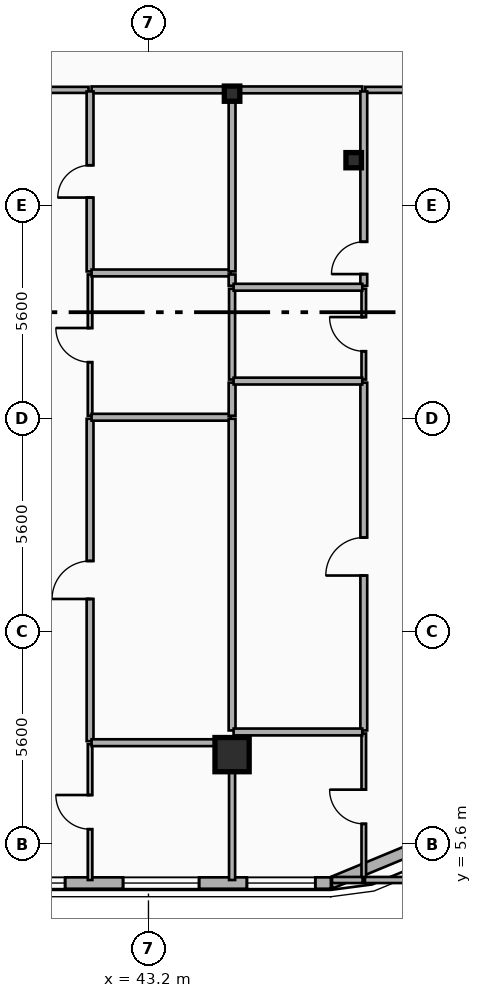
"""IFC4 building model, lengths in metres.
Left out: names, types, materials, properties, quantities, classifications, styles, units other than length and angle.
Written with IfcOpenShell. Run it as: python <this file> out.ifc"""

import sys

from ifc_helpers import new_model, si_unit, direction, frame, frame_2d, origin, origin_2d, place, context, subcontext, project, spatial, rectangle, i_section, extrude, element, fill, save


model = new_model("IFC4")
c1 = context("Model", 3, precision=1e-05, world=origin(), true_north=direction((0.0, 1.0)))
c2 = subcontext(c1, "Body", "Model", "MODEL_VIEW")
j1 = project(units=[si_unit("LENGTHUNIT", "METRE"), si_unit("PLANEANGLEUNIT", "RADIAN")], contexts=[c1])
p1 = place(None, origin())
s1 = spatial("IfcSite", under=j1, at=p1, CompositionType="ELEMENT")
p2 = place(p1, origin())
s2 = spatial("IfcBuilding", under=s1, at=p2, CompositionType="ELEMENT")
p3 = place(p2, frame((0.0, 0.0, 200.4)))
s3 = spatial("IfcBuildingStorey", under=s2, at=p3, CompositionType="ELEMENT", Elevation=200.4)
p4 = place(p3, frame((45.4, 25.35, 0.0), z_axis=(0.0, 0.0, 1.0), x_axis=(1.0, 0.0, 0.0)))
e1 = element("IfcColumn", 1, at=p4, inside=s3, PredefinedType="COLUMN", context=c2, shape_type="SweptSolid", body=[
    extrude(i_section(OverallWidth=0.408, OverallDepth=0.4, WebThickness=0.025, FlangeThickness=0.039, FilletRadius=0.015, at=origin_2d()), origin(), (0.0, 0.0, 1.0), 3.6),
])
p5 = place(p3, frame((45.4, 8.068, 0.0), z_axis=(0.0, -0.090231265542, 0.995920839584), x_axis=(1.0, 0.0, 0.0)))
e2 = element("IfcColumn", 2, at=p5, inside=s3, PredefinedType="COLUMN", context=c2, shape_type="SweptSolid", body=[
    extrude(rectangle(XDim=0.9, YDim=0.9, at=origin_2d()), origin(), (0.0, 0.0, 1.0), 3.615),
])
p6 = place(p3, frame((48.6, 23.6, 0.0), z_axis=(0.0, 0.0, 1.0), x_axis=(1.0, 0.0, 0.0)))
e3 = element("IfcColumn", 3, at=p6, inside=s3, PredefinedType="COLUMN", context=c2, shape_type="SweptSolid", body=[
    extrude(i_section(OverallWidth=0.408, OverallDepth=0.4, WebThickness=0.025, FlangeThickness=0.039, FilletRadius=0.015, at=origin_2d()), origin(), (0.0, 0.0, 1.0), 3.6),
])
p7 = place(p3, frame((50.843, 5.757, 0.0), z_axis=(0.0, 0.0, 1.0), x_axis=(-0.92389884758, -0.382636798336, 0.0)))
e4 = element("IfcWall", 4, at=p7, inside=s3, PredefinedType="SOLIDWALL", context=c2, shape_type="SweptSolid", body=[
    extrude(rectangle(XDim=3.077, YDim=0.3, at=frame_2d((1.538, 0.0))), origin(), (0.0, 0.0, 1.0), 3.34),
])
p8 = place(p3, frame((48.0, 4.58, 0.0), z_axis=(0.0, 0.0, 1.0), x_axis=(-1.0, 0.0, 0.0)))
e5 = element("IfcWall", 5, at=p8, inside=s3, PredefinedType="SOLIDWALL", context=c2, shape_type="SweptSolid", body=[
    extrude(rectangle(XDim=38.4, YDim=0.3, at=frame_2d((19.2, 0.0))), origin(), (0.0, 0.0, 1.0), 3.34),
])
p9 = place(p8, frame((36.19, 0.0, 0.8)))
e6 = element("IfcOpeningElement", 6, at=p9, cuts=e5, PredefinedType="OPENING", context=c2, shape_type="SweptSolid", body=[
    extrude(rectangle(XDim=1.8, YDim=1.8, at=frame_2d((0.9, 0.9))), frame((0.0, 0.16, 0.0), z_axis=(0.0, -1.0, 0.0), x_axis=(1.0, 0.0, 0.0)), (0.0, 0.0, 1.0), 0.32),
])
p10 = place(p8, frame((29.712, 0.0, 0.7)))
e7 = element("IfcOpeningElement", 7, at=p10, cuts=e5, PredefinedType="OPENING", context=c2, shape_type="SweptSolid", body=[
    extrude(rectangle(XDim=2.0, YDim=2.2, at=frame_2d((1.0, 1.1))), frame((0.0, 0.16, 0.0), z_axis=(0.0, -1.0, 0.0), x_axis=(1.0, 0.0, 0.0)), (0.0, 0.0, 1.0), 0.32),
])
p11 = place(p8, frame((33.038, 0.0, 0.7)))
e8 = element("IfcOpeningElement", 8, at=p11, cuts=e5, PredefinedType="OPENING", context=c2, shape_type="SweptSolid", body=[
    extrude(rectangle(XDim=2.0, YDim=2.2, at=frame_2d((1.0, 1.1))), frame((0.0, 0.16, 0.0), z_axis=(0.0, -1.0, 0.0), x_axis=(1.0, 0.0, 0.0)), (0.0, 0.0, 1.0), 0.32),
])
p12 = place(p8, frame((20.0, 0.0, 0.7)))
e9 = element("IfcOpeningElement", 9, at=p12, cuts=e5, PredefinedType="OPENING", context=c2, shape_type="SweptSolid", body=[
    extrude(rectangle(XDim=2.0, YDim=2.2, at=frame_2d((1.0, 1.1))), frame((0.0, 0.16, 0.0), z_axis=(0.0, -1.0, 0.0), x_axis=(1.0, 0.0, 0.0)), (0.0, 0.0, 1.0), 0.32),
])
p13 = place(p8, frame((25.2, 0.0, 0.7)))
e10 = element("IfcOpeningElement", 10, at=p13, cuts=e5, PredefinedType="OPENING", context=c2, shape_type="SweptSolid", body=[
    extrude(rectangle(XDim=2.0, YDim=2.2, at=frame_2d((1.0, 1.1))), frame((0.0, 0.16, 0.0), z_axis=(0.0, -1.0, 0.0), x_axis=(1.0, 0.0, 0.0)), (0.0, 0.0, 1.0), 0.32),
])
p14 = place(p8, frame((13.4, 0.0, 0.7)))
e11 = element("IfcOpeningElement", 11, at=p14, cuts=e5, PredefinedType="OPENING", context=c2, shape_type="SweptSolid", body=[
    extrude(rectangle(XDim=2.0, YDim=2.2, at=frame_2d((1.0, 1.1))), frame((0.0, 0.16, 0.0), z_axis=(0.0, -1.0, 0.0), x_axis=(1.0, 0.0, 0.0)), (0.0, 0.0, 1.0), 0.32),
])
p15 = place(p8, frame((6.993, 0.0, 0.7)))
e12 = element("IfcOpeningElement", 12, at=p15, cuts=e5, PredefinedType="OPENING", context=c2, shape_type="SweptSolid", body=[
    extrude(rectangle(XDim=2.0, YDim=2.2, at=frame_2d((1.0, 1.1))), frame((0.0, 0.16, 0.0), z_axis=(0.0, -1.0, 0.0), x_axis=(1.0, 0.0, 0.0)), (0.0, 0.0, 1.0), 0.32),
])
p16 = place(p8, frame((3.469, 0.0, 0.7)))
e13 = element("IfcOpeningElement", 13, at=p16, cuts=e5, PredefinedType="OPENING", context=c2, shape_type="SweptSolid", body=[
    extrude(rectangle(XDim=2.0, YDim=2.2, at=frame_2d((1.0, 1.1))), frame((0.0, 0.16, 0.0), z_axis=(0.0, -1.0, 0.0), x_axis=(1.0, 0.0, 0.0)), (0.0, 0.0, 1.0), 0.32),
])
p17 = place(p8, frame((0.41, 0.0, 0.8)))
e14 = element("IfcOpeningElement", 14, at=p17, cuts=e5, PredefinedType="OPENING", context=c2, shape_type="SweptSolid", body=[
    extrude(rectangle(XDim=1.8, YDim=1.8, at=frame_2d((0.9, 0.9))), frame((0.0, 0.16, 0.0), z_axis=(0.0, -1.0, 0.0), x_axis=(1.0, 0.0, 0.0)), (0.0, 0.0, 1.0), 0.32),
])
p18 = place(p3, frame((38.39, 25.45, 0.0), z_axis=(0.0, 0.0, 1.0), x_axis=(1.0, 0.0, 0.0)))
e15 = element("IfcWall", 15, at=p18, inside=s3, PredefinedType="PARTITIONING", context=c2, shape_type="SweptSolid", body=[
    extrude(rectangle(XDim=3.233, YDim=0.16, at=frame_2d((1.617, 0.0))), origin(), (0.0, 0.0, 1.0), 3.34),
])
p19 = place(p18, frame((1.116, 0.0, 0.0)))
e16 = element("IfcOpeningElement", 16, at=p19, cuts=e15, PredefinedType="OPENING", context=c2, shape_type="SweptSolid", body=[
    extrude(rectangle(XDim=1.0, YDim=2.15, at=frame_2d((0.5, 1.075))), frame((0.0, 0.09, 0.0), z_axis=(0.0, -1.0, 0.0), x_axis=(1.0, 0.0, 0.0)), (0.0, 0.0, 1.0), 0.18),
])
p20 = place(p3, frame((41.703, 25.45, 0.0), z_axis=(0.0, 0.0, 1.0), x_axis=(1.0, 0.0, 0.0)))
e17 = element("IfcWall", 17, at=p20, inside=s3, PredefinedType="PLUMBINGWALL", context=c2, shape_type="SweptSolid", body=[
    extrude(rectangle(XDim=3.657, YDim=0.18, at=frame_2d((1.829, 0.0))), origin(), (0.0, 0.0, 1.0), 2.42),
])
p21 = place(p3, frame((48.906, 25.45, 0.0), z_axis=(0.0, 0.0, 1.0), x_axis=(1.0, 0.0, 0.0)))
e18 = element("IfcWall", 18, at=p21, inside=s3, PredefinedType="PARTITIONING", context=c2, shape_type="SweptSolid", body=[
    extrude(rectangle(XDim=3.034, YDim=0.16, at=frame_2d((1.517, 0.0))), origin(), (0.0, 0.0, 1.0), 2.67),
])
p22 = place(p21, frame((1.017, 0.0, 0.0)))
e19 = element("IfcOpeningElement", 19, at=p22, cuts=e18, PredefinedType="OPENING", context=c2, shape_type="SweptSolid", body=[
    extrude(rectangle(XDim=1.0, YDim=2.15, at=frame_2d((0.5, 1.075))), frame((0.0, 0.09, 0.0), z_axis=(0.0, -1.0, 0.0), x_axis=(1.0, 0.0, 0.0)), (0.0, 0.0, 1.0), 0.18),
])
p23 = place(p3, frame((45.44, 25.45, 0.0), z_axis=(0.0, 0.0, 1.0), x_axis=(1.0, 0.0, 0.0)))
e20 = element("IfcWall", 20, at=p23, inside=s3, PredefinedType="PLUMBINGWALL", context=c2, shape_type="SweptSolid", body=[
    extrude(rectangle(XDim=3.386, YDim=0.18, at=frame_2d((1.693, 0.0))), origin(), (0.0, 0.0, 1.0), 2.42),
])
p24 = place(p3, frame((41.663, 4.66, 0.0), z_axis=(0.0, 0.0, 1.0), x_axis=(0.0, 1.0, 0.0)))
e21 = element("IfcWall", 21, at=p24, inside=s3, PredefinedType="PARTITIONING", context=c2, shape_type="SweptSolid", body=[
    extrude(rectangle(XDim=3.573, YDim=0.12, at=frame_2d((1.787, 0.0))), origin(), (0.0, 0.0, 1.0), 3.0),
])
p25 = place(p24, frame((1.336, 0.0, 0.0)))
e22 = element("IfcOpeningElement", 22, at=p25, cuts=e21, PredefinedType="OPENING", context=c2, shape_type="SweptSolid", body=[
    extrude(rectangle(XDim=0.9, YDim=2.1, at=frame_2d((0.45, 1.05))), frame((0.0, 0.07, 0.0), z_axis=(0.0, -1.0, 0.0), x_axis=(1.0, 0.0, 0.0)), (0.0, 0.0, 1.0), 0.14),
])
p26 = place(p3, frame((41.663, 8.313, 0.0), z_axis=(0.0, 0.0, 1.0), x_axis=(0.0, 1.0, 0.0)))
e23 = element("IfcWall", 23, at=p26, inside=s3, PredefinedType="PLUMBINGWALL", context=c2, shape_type="SweptSolid", body=[
    extrude(rectangle(XDim=8.483, YDim=0.18, at=frame_2d((4.241, 0.0))), origin(), (0.0, 0.0, 1.0), 2.87),
])
p27 = place(p26, frame((3.741, 0.0, 0.0)))
e24 = element("IfcOpeningElement", 24, at=p27, cuts=e23, PredefinedType="OPENING", context=c2, shape_type="SweptSolid", body=[
    extrude(rectangle(XDim=1.0, YDim=2.15, at=frame_2d((0.5, 1.075))), frame((0.0, 0.1, 0.0), z_axis=(0.0, -1.0, 0.0), x_axis=(1.0, 0.0, 0.0)), (0.0, 0.0, 1.0), 0.2),
])
p28 = place(p3, frame((41.663, 16.876, 0.0), z_axis=(0.0, 0.0, 1.0), x_axis=(0.0, 1.0, 0.0)))
e25 = element("IfcWall", 25, at=p28, inside=s3, PredefinedType="PARTITIONING", context=c2, shape_type="SweptSolid", body=[
    extrude(rectangle(XDim=3.717, YDim=0.12, at=frame_2d((1.858, 0.0))), origin(), (0.0, 0.0, 1.0), 2.87),
])
p29 = place(p28, frame((1.408, 0.0, 0.0)))
e26 = element("IfcOpeningElement", 26, at=p29, cuts=e25, PredefinedType="OPENING", context=c2, shape_type="SweptSolid", body=[
    extrude(rectangle(XDim=0.9, YDim=2.1, at=frame_2d((0.45, 1.05))), frame((0.0, 0.07, 0.0), z_axis=(0.0, -1.0, 0.0), x_axis=(1.0, 0.0, 0.0)), (0.0, 0.0, 1.0), 0.14),
])
p30 = place(p3, frame((41.663, 20.673, 0.0), z_axis=(0.0, 0.0, 1.0), x_axis=(0.0, 1.0, 0.0)))
e27 = element("IfcWall", 27, at=p30, inside=s3, PredefinedType="PLUMBINGWALL", context=c2, shape_type="SweptSolid", body=[
    extrude(rectangle(XDim=4.737, YDim=0.18, at=frame_2d((2.368, 0.0))), origin(), (0.0, 0.0, 1.0), 2.88),
])
p31 = place(p30, frame((1.944, 0.0, 0.0)))
e28 = element("IfcOpeningElement", 28, at=p31, cuts=e27, PredefinedType="OPENING", context=c2, shape_type="SweptSolid", body=[
    extrude(rectangle(XDim=0.85, YDim=2.1, at=frame_2d((0.425, 1.05))), frame((0.0, 0.1, 0.0), z_axis=(0.0, -1.0, 0.0), x_axis=(1.0, 0.0, 0.0)), (0.0, 0.0, 1.0), 0.2),
])
p32 = place(p3, frame((41.703, 8.273, 0.0), z_axis=(0.0, 0.0, 1.0), x_axis=(1.0, 0.0, 0.0)))
e29 = element("IfcWall", 29, at=p32, inside=s3, PredefinedType="PLUMBINGWALL", context=c2, shape_type="SweptSolid", body=[
    extrude(rectangle(XDim=3.657, YDim=0.18, at=frame_2d((1.829, 0.0))), origin(), (0.0, 0.0, 1.0), 2.42),
])
p33 = place(p3, frame((45.4, 4.66, 0.0), z_axis=(0.0, 0.0, 1.0), x_axis=(0.0, 1.0, 0.0)))
e30 = element("IfcWall", 30, at=p33, inside=s3, PredefinedType="PARTITIONING", context=c2, shape_type="SweptSolid", body=[
    extrude(rectangle(XDim=3.573, YDim=0.16, at=frame_2d((1.787, 0.0))), origin(), (0.0, 0.0, 1.0), 2.42),
])
p34 = place(p3, frame((41.703, 16.836, 0.0), z_axis=(0.0, 0.0, 1.0), x_axis=(1.0, 0.0, 0.0)))
e31 = element("IfcWall", 31, at=p34, inside=s3, PredefinedType="PLUMBINGWALL", context=c2, shape_type="SweptSolid", body=[
    extrude(rectangle(XDim=3.657, YDim=0.18, at=frame_2d((1.829, 0.0))), origin(), (0.0, 0.0, 1.0), 2.42),
])
p35 = place(p3, frame((45.4, 8.595, 0.0), z_axis=(0.0, 0.0, 1.0), x_axis=(0.0, 1.0, 0.0)))
e32 = element("IfcWall", 32, at=p35, inside=s3, PredefinedType="PLUMBINGWALL", context=c2, shape_type="SweptSolid", body=[
    extrude(rectangle(XDim=8.201, YDim=0.18, at=frame_2d((4.101, 0.0))), origin(), (0.0, 0.0, 1.0), 2.42),
])
p36 = place(p3, frame((41.703, 20.633, 0.0), z_axis=(0.0, 0.0, 1.0), x_axis=(1.0, 0.0, 0.0)))
e33 = element("IfcWall", 33, at=p36, inside=s3, PredefinedType="PLUMBINGWALL", context=c2, shape_type="SweptSolid", body=[
    extrude(rectangle(XDim=3.657, YDim=0.18, at=frame_2d((1.829, 0.0))), origin(), (0.0, 0.0, 1.0), 2.42),
])
p37 = place(p3, frame((45.4, 16.876, 0.0), z_axis=(0.0, 0.0, 1.0), x_axis=(0.0, 1.0, 0.0)))
e34 = element("IfcWall", 34, at=p37, inside=s3, PredefinedType="PLUMBINGWALL", context=c2, shape_type="SweptSolid", body=[
    extrude(rectangle(XDim=0.872, YDim=0.18, at=frame_2d((0.436, 0.0))), origin(), (0.0, 0.0, 1.0), 2.42),
])
p38 = place(p3, frame((45.4, 17.828, 0.0), z_axis=(0.0, 0.0, 1.0), x_axis=(0.0, 1.0, 0.0)))
e35 = element("IfcWall", 35, at=p38, inside=s3, PredefinedType="PARTITIONING", context=c2, shape_type="SweptSolid", body=[
    extrude(rectangle(XDim=2.389, YDim=0.16, at=frame_2d((1.195, 0.0))), origin(), (0.0, 0.0, 1.0), 2.42),
])
p39 = place(p3, frame((45.4, 20.297, 0.0), z_axis=(0.0, 0.0, 1.0), x_axis=(0.0, 1.0, 0.0)))
e36 = element("IfcWall", 36, at=p39, inside=s3, PredefinedType="PLUMBINGWALL", context=c2, shape_type="SweptSolid", body=[
    extrude(rectangle(XDim=0.296, YDim=0.18, at=frame_2d((0.148, 0.0))), origin(), (0.0, 0.0, 1.0), 2.42),
])
p40 = place(p3, frame((45.4, 20.673, 0.0), z_axis=(0.0, 0.0, 1.0), x_axis=(0.0, 1.0, 0.0)))
e37 = element("IfcWall", 37, at=p40, inside=s3, PredefinedType="PLUMBINGWALL", context=c2, shape_type="SweptSolid", body=[
    extrude(rectangle(XDim=4.737, YDim=0.18, at=frame_2d((2.368, 0.0))), origin(), (0.0, 0.0, 1.0), 2.42),
])
p41 = place(p3, frame((48.866, 4.66, 0.0), z_axis=(0.0, 0.0, 1.0), x_axis=(0.0, 1.0, 0.0)))
e38 = element("IfcWall", 38, at=p41, inside=s3, PredefinedType="PARTITIONING", context=c2, shape_type="SweptSolid", body=[
    extrude(rectangle(XDim=3.855, YDim=0.12, at=frame_2d((1.927, 0.0))), origin(), (0.0, 0.0, 1.0), 3.34),
])
p42 = place(p41, frame((1.478, 0.0, 0.0)))
e39 = element("IfcOpeningElement", 39, at=p42, cuts=e38, PredefinedType="OPENING", context=c2, shape_type="SweptSolid", body=[
    extrude(rectangle(XDim=0.9, YDim=2.1, at=frame_2d((0.45, 1.05))), frame((0.0, 0.07, 0.0), z_axis=(0.0, -1.0, 0.0), x_axis=(1.0, 0.0, 0.0)), (0.0, 0.0, 1.0), 0.14),
])
p43 = place(p3, frame((48.866, 8.595, 0.0), z_axis=(0.0, 0.0, 1.0), x_axis=(0.0, 1.0, 0.0)))
e40 = element("IfcWall", 40, at=p43, inside=s3, PredefinedType="PLUMBINGWALL", context=c2, shape_type="SweptSolid", body=[
    extrude(rectangle(XDim=9.153, YDim=0.18, at=frame_2d((4.577, 0.0))), origin(), (0.0, 0.0, 1.0), 2.82),
])
p44 = place(p43, frame((4.076, 0.0, 0.0)))
e41 = element("IfcOpeningElement", 41, at=p44, cuts=e40, PredefinedType="OPENING", context=c2, shape_type="SweptSolid", body=[
    extrude(rectangle(XDim=1.0, YDim=2.15, at=frame_2d((0.5, 1.075))), frame((0.0, 0.1, 0.0), z_axis=(0.0, -1.0, 0.0), x_axis=(1.0, 0.0, 0.0)), (0.0, 0.0, 1.0), 0.2),
])
p45 = place(p3, frame((48.866, 17.828, 0.0), z_axis=(0.0, 0.0, 1.0), x_axis=(0.0, 1.0, 0.0)))
e42 = element("IfcWall", 42, at=p45, inside=s3, PredefinedType="PARTITIONING", context=c2, shape_type="SweptSolid", body=[
    extrude(rectangle(XDim=2.389, YDim=0.12, at=frame_2d((1.195, 0.0))), origin(), (0.0, 0.0, 1.0), 2.82),
])
p46 = place(p45, frame((0.744, 0.0, 0.0)))
e43 = element("IfcOpeningElement", 43, at=p46, cuts=e42, PredefinedType="OPENING", context=c2, shape_type="SweptSolid", body=[
    extrude(rectangle(XDim=0.9, YDim=2.1, at=frame_2d((0.45, 1.05))), frame((0.0, 0.07, 0.0), z_axis=(0.0, -1.0, 0.0), x_axis=(1.0, 0.0, 0.0)), (0.0, 0.0, 1.0), 0.14),
])
p47 = place(p3, frame((48.866, 20.297, 0.0), z_axis=(0.0, 0.0, 1.0), x_axis=(0.0, 1.0, 0.0)))
e44 = element("IfcWall", 44, at=p47, inside=s3, PredefinedType="PLUMBINGWALL", context=c2, shape_type="SweptSolid", body=[
    extrude(rectangle(XDim=5.113, YDim=0.18, at=frame_2d((2.556, 0.0))), origin(), (0.0, 0.0, 1.0), 2.82),
])
p48 = place(p47, frame((0.306, 0.0, 0.0)))
e45 = element("IfcOpeningElement", 45, at=p48, cuts=e44, PredefinedType="OPENING", context=c2, shape_type="SweptSolid", body=[
    extrude(rectangle(XDim=0.85, YDim=2.1, at=frame_2d((0.425, 1.05))), frame((0.0, 0.1, 0.0), z_axis=(0.0, -1.0, 0.0), x_axis=(1.0, 0.0, 0.0)), (0.0, 0.0, 1.0), 0.2),
])
for number, where, z_axis, x_axis in (
    (46, (45.44, 8.555, 0.0), (0.0, 0.0, 1.0), (1.0, 0.0, 0.0)),
    (47, (45.44, 17.788, 0.0), (0.0, 0.0, 1.0), (1.0, 0.0, 0.0)),
    (48, (45.44, 20.257, 0.0), (0.0, 0.0, 1.0), (1.0, 0.0, 0.0)),
):
    element("IfcWall", number, at=place(p3, frame(where, z_axis=z_axis, x_axis=x_axis)), inside=s3, PredefinedType="PLUMBINGWALL", context=c2, shape_type="SweptSolid", body=[
        extrude(rectangle(XDim=3.386, YDim=0.18, at=frame_2d((1.693, 0.0))), origin(), (0.0, 0.0, 1.0), 2.42),
    ])
p49 = place(p3, frame((48.896, 4.66, 0.0), z_axis=(0.0, 0.0, 1.0), x_axis=(1.0, 0.0, 0.0)))
e49 = element("IfcWall", 49, at=p49, inside=s3, PredefinedType="PARTITIONING", context=c2, shape_type="SweptSolid", body=[
    extrude(rectangle(XDim=3.014, YDim=0.16, at=frame_2d((1.507, 0.0))), origin(), (0.0, 0.0, 1.0), 3.34),
])
p50 = place(p3, frame((48.03, 4.66, 0.0), z_axis=(0.0, 0.0, 1.0), x_axis=(1.0, 0.0, 0.0)))
e50 = element("IfcWall", 50, at=p50, inside=s3, PredefinedType="PARTITIONING", context=c2, shape_type="SweptSolid", body=[
    extrude(rectangle(XDim=0.806, YDim=0.16, at=frame_2d((0.403, 0.0))), origin(), (0.0, 0.0, 1.0), 3.34),
])
p51 = place(p15, origin())
e51 = element("IfcWindow", 51, at=p51, inside=s3, PartitioningType="SINGLE_PANEL", PredefinedType="WINDOW", context=c2, shape_type="SweptSolid", body=[
    extrude(rectangle(XDim=2.0, YDim=2.2, at=frame_2d((1.0, 1.1))), frame((0.0, 0.03, 0.0), z_axis=(0.0, -1.0, 0.0), x_axis=(1.0, 0.0, 0.0)), (0.0, 0.0, 1.0), 0.06),
])
fill(e12, e51)
p52 = place(p16, origin())
e52 = element("IfcWindow", 52, at=p52, inside=s3, PartitioningType="SINGLE_PANEL", PredefinedType="WINDOW", context=c2, shape_type="SweptSolid", body=[
    extrude(rectangle(XDim=2.0, YDim=2.2, at=frame_2d((1.0, 1.1))), frame((0.0, 0.03, 0.0), z_axis=(0.0, -1.0, 0.0), x_axis=(1.0, 0.0, 0.0)), (0.0, 0.0, 1.0), 0.06),
])
fill(e13, e52)
p53 = place(p17, origin())
e53 = element("IfcWindow", 53, at=p53, inside=s3, PartitioningType="SINGLE_PANEL", PredefinedType="WINDOW", context=c2, shape_type="SweptSolid", body=[
    extrude(rectangle(XDim=1.8, YDim=1.8, at=frame_2d((0.9, 0.9))), frame((0.0, 0.03, 0.0), z_axis=(0.0, -1.0, 0.0), x_axis=(1.0, 0.0, 0.0)), (0.0, 0.0, 1.0), 0.06),
])
fill(e14, e53)
p54 = place(p25, origin())
e54 = element("IfcDoor", 54, at=p54, inside=s3, OperationType="SINGLE_SWING_RIGHT", PredefinedType="DOOR", context=c2, shape_type="SweptSolid", body=[
    extrude(rectangle(XDim=0.9, YDim=2.1, at=frame_2d((0.45, 1.05))), frame((0.0, 0.025, 0.0), z_axis=(0.0, -1.0, 0.0), x_axis=(1.0, 0.0, 0.0)), (0.0, 0.0, 1.0), 0.05),
])
fill(e22, e54)
p55 = place(p27, origin())
e55 = element("IfcDoor", 55, at=p55, inside=s3, OperationType="SINGLE_SWING_LEFT", PredefinedType="DOOR", context=c2, shape_type="SweptSolid", body=[
    extrude(rectangle(XDim=1.0, YDim=2.15, at=frame_2d((0.5, 1.075))), frame((0.0, 0.025, 0.0), z_axis=(0.0, -1.0, 0.0), x_axis=(1.0, 0.0, 0.0)), (0.0, 0.0, 1.0), 0.05),
])
fill(e24, e55)
p56 = place(p29, origin())
e56 = element("IfcDoor", 56, at=p56, inside=s3, OperationType="SINGLE_SWING_RIGHT", PredefinedType="DOOR", context=c2, shape_type="SweptSolid", body=[
    extrude(rectangle(XDim=0.9, YDim=2.1, at=frame_2d((0.45, 1.05))), frame((0.0, 0.025, 0.0), z_axis=(0.0, -1.0, 0.0), x_axis=(1.0, 0.0, 0.0)), (0.0, 0.0, 1.0), 0.05),
])
fill(e26, e56)
p57 = place(p31, origin())
e57 = element("IfcDoor", 57, at=p57, inside=s3, OperationType="SINGLE_SWING_LEFT", PredefinedType="DOOR", context=c2, shape_type="SweptSolid", body=[
    extrude(rectangle(XDim=0.85, YDim=2.1, at=frame_2d((0.425, 1.05))), frame((0.0, 0.025, 0.0), z_axis=(0.0, -1.0, 0.0), x_axis=(1.0, 0.0, 0.0)), (0.0, 0.0, 1.0), 0.05),
])
fill(e28, e57)
p58 = place(p42, origin())
e58 = element("IfcDoor", 58, at=p58, inside=s3, OperationType="SINGLE_SWING_RIGHT", PredefinedType="DOOR", context=c2, shape_type="SweptSolid", body=[
    extrude(rectangle(XDim=0.9, YDim=2.1, at=frame_2d((0.45, 1.05))), frame((0.0, 0.025, 0.0), z_axis=(0.0, -1.0, 0.0), x_axis=(1.0, 0.0, 0.0)), (0.0, 0.0, 1.0), 0.05),
])
fill(e39, e58)
p59 = place(p44, origin())
e59 = element("IfcDoor", 59, at=p59, inside=s3, OperationType="SINGLE_SWING_LEFT", PredefinedType="DOOR", context=c2, shape_type="SweptSolid", body=[
    extrude(rectangle(XDim=1.0, YDim=2.15, at=frame_2d((0.5, 1.075))), frame((0.0, 0.025, 0.0), z_axis=(0.0, -1.0, 0.0), x_axis=(1.0, 0.0, 0.0)), (0.0, 0.0, 1.0), 0.05),
])
fill(e41, e59)
p60 = place(p46, origin())
e60 = element("IfcDoor", 60, at=p60, inside=s3, OperationType="SINGLE_SWING_RIGHT", PredefinedType="DOOR", context=c2, shape_type="SweptSolid", body=[
    extrude(rectangle(XDim=0.9, YDim=2.1, at=frame_2d((0.45, 1.05))), frame((0.0, 0.025, 0.0), z_axis=(0.0, -1.0, 0.0), x_axis=(1.0, 0.0, 0.0)), (0.0, 0.0, 1.0), 0.05),
])
fill(e43, e60)
p61 = place(p48, origin())
e61 = element("IfcDoor", 61, at=p61, inside=s3, OperationType="SINGLE_SWING_LEFT", PredefinedType="DOOR", context=c2, shape_type="SweptSolid", body=[
    extrude(rectangle(XDim=0.85, YDim=2.1, at=frame_2d((0.425, 1.05))), frame((0.0, 0.025, 0.0), z_axis=(0.0, -1.0, 0.0), x_axis=(1.0, 0.0, 0.0)), (0.0, 0.0, 1.0), 0.05),
])
fill(e45, e61)
save(model, sys.argv[1])
